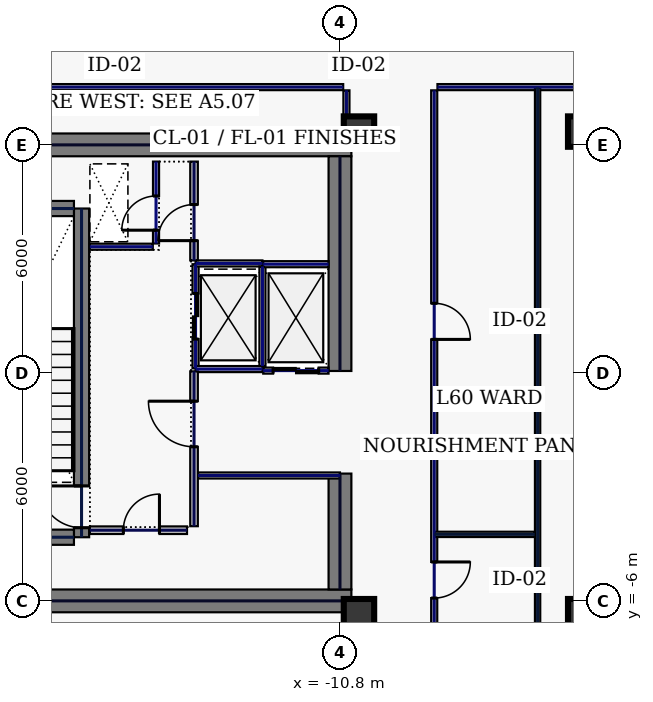
"""IFC4 building model, lengths in metres.
Left out: names, types, materials, properties, quantities, classifications, styles, units other than length and angle.
Written with IfcOpenShell. Run it as: python <this file> out.ifc"""

import sys

from ifc_helpers import new_model, si_unit, direction, frame, frame_2d, origin, origin_2d, place, context, subcontext, project, spatial, rectangle, hollow_rectangle, extrude, element, fill, save


model = new_model("IFC4")
c1 = context("Model", 3, precision=1e-05, world=origin(), true_north=direction((0.0, 1.0)))
c2 = subcontext(c1, "Body", "Model", "MODEL_VIEW")
j1 = project(units=[si_unit("LENGTHUNIT", "METRE"), si_unit("PLANEANGLEUNIT", "RADIAN")], contexts=[c1])
p1 = place(None, origin())
s1 = spatial("IfcSite", under=j1, at=p1, CompositionType="ELEMENT")
p2 = place(p1, origin())
s2 = spatial("IfcBuilding", under=s1, at=p2, CompositionType="ELEMENT")
p3 = place(p2, frame((0.0, 0.0, 259.0)))
s3 = spatial("IfcBuildingStorey", under=s2, at=p3, CompositionType="ELEMENT", Elevation=259.0)
for number, where, z_axis, x_axis in (
    (1, (-22.0, 6.0, 0.0), (0.0, 0.0, 1.0), (1.0, 0.0, 0.0)),
    (2, (-22.0, -6.0, 0.0), (0.0, 0.0, 1.0), (1.0, 0.0, 0.0)),
):
    element("IfcWall", number, at=place(p3, frame(where, z_axis=z_axis, x_axis=x_axis)), inside=s3, PredefinedType="SHEAR", context=c2, shape_type="SweptSolid", body=[
        extrude(rectangle(XDim=11.5, YDim=0.6, at=frame_2d((5.75, 0.0))), origin(), (0.0, 0.0, 1.0), 3.74),
    ])
p4 = place(p3, frame((-10.8, -5.7, 0.0), z_axis=(0.0, 0.0, 1.0), x_axis=(0.0, 1.0, 0.0)))
e3 = element("IfcWall", 3, at=p4, inside=s3, PredefinedType="SHEAR", context=c2, shape_type="SweptSolid", body=[
    extrude(rectangle(XDim=3.05, YDim=0.6, at=frame_2d((1.525, 0.0))), origin(), (0.0, 0.0, 1.0), 3.74),
])
p5 = place(p3, frame((-10.8, 0.05, 0.0), z_axis=(0.0, 0.0, 1.0), x_axis=(0.0, 1.0, 0.0)))
e4 = element("IfcWall", 4, at=p5, inside=s3, PredefinedType="SHEAR", context=c2, shape_type="SweptSolid", body=[
    extrude(rectangle(XDim=5.65, YDim=0.6, at=frame_2d((2.825, 0.0))), origin(), (0.0, 0.0, 1.0), 3.74),
])
p6 = place(p3, frame((-17.6, -4.325, 0.0), z_axis=(0.0, 0.0, 1.0), x_axis=(0.0, 1.0, 0.0)))
e5 = element("IfcWall", 5, at=p6, inside=s3, PredefinedType="SHEAR", context=c2, shape_type="SweptSolid", body=[
    extrude(rectangle(XDim=8.65, YDim=0.4, at=frame_2d((4.325, 0.0))), origin(), (0.0, 0.0, 1.0), 3.74),
])
p7 = place(p6, frame((0.25, 0.0, 0.0)))
e6 = element("IfcOpeningElement", 6, at=p7, cuts=e5, PredefinedType="OPENING", context=c2, shape_type="SweptSolid", body=[
    extrude(rectangle(XDim=1.1, YDim=2.2, at=frame_2d((0.55, 1.1))), frame((0.0, 0.21, 0.0), z_axis=(0.0, -1.0, 0.0), x_axis=(1.0, 0.0, 0.0)), (0.0, 0.0, 1.0), 0.42),
])
for number, where, z_axis, x_axis in (
    (7, (-21.2, -4.325, 0.0), (0.0, 0.0, 1.0), (1.0, 0.0, 0.0)),
    (8, (-21.2, 4.325, 0.0), (0.0, 0.0, 1.0), (1.0, 0.0, 0.0)),
):
    element("IfcWall", number, at=place(p3, frame(where, z_axis=z_axis, x_axis=x_axis)), inside=s3, PredefinedType="SHEAR", context=c2, shape_type="SweptSolid", body=[
        extrude(rectangle(XDim=3.4, YDim=0.4, at=frame_2d((1.7, 0.0))), origin(), (0.0, 0.0, 1.0), 3.74),
    ])
for number, where, z_axis, x_axis in (
    (9, (-10.3, -6.35, 0.0), (0.0, 0.0, 1.0), (1.0, 0.0, 0.0)),
    (10, (-10.3, 6.35, 0.0), (0.0, 0.0, 1.0), (1.0, 0.0, 0.0)),
    (11, (-4.4, -6.35, 0.0), (0.0, 0.0, 1.0), (1.0, 0.0, 0.0)),
    (12, (-4.4, 6.35, 0.0), (0.0, 0.0, 1.0), (1.0, 0.0, 0.0)),
):
    element("IfcColumn", number, at=place(p3, frame(where, z_axis=z_axis, x_axis=x_axis)), inside=s3, PredefinedType="COLUMN", context=c2, shape_type="SweptSolid", body=[
        extrude(hollow_rectangle(XDim=0.8, YDim=0.8, WallThickness=0.036, at=origin_2d()), origin(), (0.0, 0.0, 1.0), 3.74),
    ])
p8 = place(p3, frame((-14.6, 0.12, 0.0), z_axis=(0.0, 0.0, 1.0), x_axis=(0.0, 1.0, 0.0)))
e13 = element("IfcWall", 13, at=p8, inside=s3, PredefinedType="PARTITIONING", context=c2, shape_type="SweptSolid", body=[
    extrude(rectangle(XDim=2.74, YDim=0.16, at=frame_2d((1.37, 0.0))), origin(), (0.0, 0.0, 1.0), 3.74),
])
p9 = place(p8, frame((0.77, 0.0, 0.0)))
e14 = element("IfcOpeningElement", 14, at=p9, cuts=e13, PredefinedType="OPENING", context=c2, shape_type="SweptSolid", body=[
    extrude(rectangle(XDim=1.2, YDim=2.2, at=frame_2d((0.6, 1.1))), frame((0.0, 0.09, 0.0), z_axis=(0.0, -1.0, 0.0), x_axis=(1.0, 0.0, 0.0)), (0.0, 0.0, 1.0), 0.18),
])
for number, where, z_axis, x_axis in (
    (15, (-14.6, 0.1, 0.0), (0.0, 0.0, 1.0), (1.0, 0.0, 0.0)),
    (16, (-14.6, 2.88, 0.0), (0.0, 0.0, 1.0), (1.0, 0.0, 0.0)),
):
    element("IfcWall", number, at=place(p3, frame(where, z_axis=z_axis, x_axis=x_axis)), inside=s3, PredefinedType="PARTITIONING", context=c2, shape_type="SweptSolid", body=[
        extrude(rectangle(XDim=1.76, YDim=0.16, at=frame_2d((0.88, 0.0))), origin(), (0.0, 0.0, 1.0), 3.74),
    ])
p10 = place(p3, frame((-12.84, 0.18, 0.0), z_axis=(0.0, 0.0, 1.0), x_axis=(0.0, 1.0, 0.0)))
e17 = element("IfcWall", 17, at=p10, inside=s3, PredefinedType="PARTITIONING", context=c2, shape_type="SweptSolid", body=[
    extrude(rectangle(XDim=2.62, YDim=0.16, at=frame_2d((1.31, 0.0))), origin(), (0.0, 0.0, 1.0), 3.74),
])
p11 = place(p3, frame((-12.82, 0.06, 0.0), z_axis=(0.0, 0.0, 1.0), x_axis=(1.0, 0.0, 0.0)))
e18 = element("IfcWall", 18, at=p11, inside=s3, PredefinedType="PARTITIONING", context=c2, shape_type="SweptSolid", body=[
    extrude(rectangle(XDim=1.72, YDim=0.16, at=frame_2d((0.86, 0.0))), origin(), (0.0, 0.0, 1.0), 3.74),
])
p12 = place(p11, frame((0.26, 0.0, 0.0)))
e19 = element("IfcOpeningElement", 19, at=p12, cuts=e18, PredefinedType="OPENING", context=c2, shape_type="SweptSolid", body=[
    extrude(rectangle(XDim=1.2, YDim=2.2, at=frame_2d((0.6, 1.1))), frame((0.0, 0.09, 0.0), z_axis=(0.0, -1.0, 0.0), x_axis=(1.0, 0.0, 0.0)), (0.0, 0.0, 1.0), 0.18),
])
p13 = place(p3, frame((-12.82, 2.86, 0.0), z_axis=(0.0, 0.0, 1.0), x_axis=(1.0, 0.0, 0.0)))
e20 = element("IfcWall", 20, at=p13, inside=s3, PredefinedType="PARTITIONING", context=c2, shape_type="SweptSolid", body=[
    extrude(rectangle(XDim=1.72, YDim=0.16, at=frame_2d((0.86, 0.0))), origin(), (0.0, 0.0, 1.0), 3.74),
])
p14 = place(p3, frame((-15.64, 3.405, 0.0), z_axis=(0.0, 0.0, 1.0), x_axis=(0.0, 1.0, 0.0)))
e21 = element("IfcWall", 21, at=p14, inside=s3, PredefinedType="PARTITIONING", context=c2, shape_type="SweptSolid", body=[
    extrude(rectangle(XDim=2.155, YDim=0.16, at=frame_2d((1.078, 0.0))), origin(), (0.0, 0.0, 1.0), 3.74),
])
p15 = place(p14, frame((0.35, 0.0, 0.0)))
e22 = element("IfcOpeningElement", 22, at=p15, cuts=e21, PredefinedType="OPENING", context=c2, shape_type="SweptSolid", body=[
    extrude(rectangle(XDim=0.9, YDim=2.2, at=frame_2d((0.45, 1.1))), frame((0.0, 0.09, 0.0), z_axis=(0.0, -1.0, 0.0), x_axis=(1.0, 0.0, 0.0)), (0.0, 0.0, 1.0), 0.18),
])
p16 = place(p3, frame((-17.38, 3.32, 0.0), z_axis=(0.0, 0.0, 1.0), x_axis=(1.0, 0.0, 0.0)))
e23 = element("IfcWall", 23, at=p16, inside=s3, PredefinedType="PARTITIONING", context=c2, shape_type="SweptSolid", body=[
    extrude(rectangle(XDim=1.655, YDim=0.16, at=frame_2d((0.827, 0.0))), origin(), (0.0, 0.0, 1.0), 3.74),
])
p17 = place(p3, frame((-17.38, -4.14, 0.0), z_axis=(0.0, 0.0, 1.0), x_axis=(1.0, 0.0, 0.0)))
e24 = element("IfcWall", 24, at=p17, inside=s3, PredefinedType="SOLIDWALL", context=c2, shape_type="SweptSolid", body=[
    extrude(rectangle(XDim=2.555, YDim=0.2, at=frame_2d((1.277, 0.0))), origin(), (0.0, 0.0, 1.0), 3.74),
])
p18 = place(p17, frame((0.88, 0.0, 0.0)))
e25 = element("IfcOpeningElement", 25, at=p18, cuts=e24, PredefinedType="OPENING", context=c2, shape_type="SweptSolid", body=[
    extrude(rectangle(XDim=0.95, YDim=2.2, at=frame_2d((0.475, 1.1))), frame((0.0, 0.11, 0.0), z_axis=(0.0, -1.0, 0.0), x_axis=(1.0, 0.0, 0.0)), (0.0, 0.0, 1.0), 0.22),
])
p19 = place(p3, frame((-14.535, -2.7, 0.0), z_axis=(0.0, 0.0, 1.0), x_axis=(1.0, 0.0, 0.0)))
e26 = element("IfcWall", 26, at=p19, inside=s3, PredefinedType="PARTITIONING", context=c2, shape_type="SweptSolid", body=[
    extrude(rectangle(XDim=3.735, YDim=0.16, at=frame_2d((1.867, 0.0))), origin(), (0.0, 0.0, 1.0), 3.74),
])
p20 = place(p3, frame((-14.64, 2.96, 0.0), z_axis=(0.0, 0.0, 1.0), x_axis=(0.0, 1.0, 0.0)))
e27 = element("IfcWall", 27, at=p20, inside=s3, PredefinedType="SOLIDWALL", context=c2, shape_type="SweptSolid", body=[
    extrude(rectangle(XDim=2.6, YDim=0.2, at=frame_2d((1.3, 0.0))), origin(), (0.0, 0.0, 1.0), 3.74),
])
p21 = place(p20, frame((0.52, 0.0, 0.0)))
e28 = element("IfcOpeningElement", 28, at=p21, cuts=e27, PredefinedType="OPENING", context=c2, shape_type="SweptSolid", body=[
    extrude(rectangle(XDim=0.95, YDim=2.2, at=frame_2d((0.475, 1.1))), frame((0.0, 0.11, 0.0), z_axis=(0.0, -1.0, 0.0), x_axis=(1.0, 0.0, 0.0)), (0.0, 0.0, 1.0), 0.22),
])
p22 = place(p3, frame((-14.64, -4.035, 0.0), z_axis=(0.0, 0.0, 1.0), x_axis=(0.0, 1.0, 0.0)))
e29 = element("IfcWall", 29, at=p22, inside=s3, PredefinedType="SOLIDWALL", context=c2, shape_type="SweptSolid", body=[
    extrude(rectangle(XDim=4.075, YDim=0.2, at=frame_2d((2.038, 0.0))), origin(), (0.0, 0.0, 1.0), 3.74),
])
p23 = place(p22, frame((2.09, 0.0, 0.0)))
e30 = element("IfcOpeningElement", 30, at=p23, cuts=e29, PredefinedType="OPENING", context=c2, shape_type="SweptSolid", body=[
    extrude(rectangle(XDim=1.2, YDim=2.2, at=frame_2d((0.6, 1.1))), frame((0.0, 0.11, 0.0), z_axis=(0.0, -1.0, 0.0), x_axis=(1.0, 0.0, 0.0)), (0.0, 0.0, 1.0), 0.22),
])
p24 = place(p3, frame((-3.965, 7.52, 0.0), z_axis=(0.0, 0.0, 1.0), x_axis=(-1.0, 0.0, 0.0)))
e31 = element("IfcWall", 31, at=p24, inside=s3, PredefinedType="PARTITIONING", context=c2, shape_type="SweptSolid", body=[
    extrude(rectangle(XDim=4.27, YDim=0.16, at=frame_2d((2.135, 0.0))), origin(), (0.0, 0.0, 1.0), 3.74),
])
p25 = place(p3, frame((-8.32, 7.435, 0.0), z_axis=(0.0, 0.0, 1.0), x_axis=(0.0, -1.0, 0.0)))
e32 = element("IfcWall", 32, at=p25, inside=s3, PredefinedType="PARTITIONING", context=c2, shape_type="SweptSolid", body=[
    extrude(rectangle(XDim=14.82, YDim=0.16, at=frame_2d((7.41, 0.0))), origin(), (0.0, 0.0, 1.0), 3.74),
])
p26 = place(p25, frame((12.411, 0.0, 0.0)))
e33 = element("IfcOpeningElement", 33, at=p26, cuts=e32, PredefinedType="OPENING", context=c2, shape_type="SweptSolid", body=[
    extrude(rectangle(XDim=0.95, YDim=2.2, at=frame_2d((0.475, 1.1))), frame((0.0, 0.09, 0.0), z_axis=(0.0, -1.0, 0.0), x_axis=(1.0, 0.0, 0.0)), (0.0, 0.0, 1.0), 0.18),
])
p27 = place(p25, frame((5.604, 0.0, 0.0)))
e34 = element("IfcOpeningElement", 34, at=p27, cuts=e32, PredefinedType="OPENING", context=c2, shape_type="SweptSolid", body=[
    extrude(rectangle(XDim=0.95, YDim=2.2, at=frame_2d((0.475, 1.1))), frame((0.0, 0.09, 0.0), z_axis=(0.0, -1.0, 0.0), x_axis=(1.0, 0.0, 0.0)), (0.0, 0.0, 1.0), 0.18),
])
p28 = place(p3, frame((-10.63, -7.385, 0.0), z_axis=(0.0, 0.0, 1.0), x_axis=(0.0, 1.0, 0.0)))
e35 = element("IfcWall", 35, at=p28, inside=s3, PredefinedType="PARTITIONING", context=c2, shape_type="SweptSolid", body=[
    extrude(rectangle(XDim=0.965, YDim=0.16, at=frame_2d((0.482, 0.0))), origin(), (0.0, 0.0, 1.0), 3.74),
])
p29 = place(p3, frame((-10.63, 6.42, 0.0), z_axis=(0.0, 0.0, 1.0), x_axis=(0.0, 1.0, 0.0)))
e36 = element("IfcWall", 36, at=p29, inside=s3, PredefinedType="PARTITIONING", context=c2, shape_type="SweptSolid", body=[
    extrude(rectangle(XDim=1.015, YDim=0.16, at=frame_2d((0.508, 0.0))), origin(), (0.0, 0.0, 1.0), 3.74),
])
p30 = place(p3, frame((-10.715, 7.52, 0.0), z_axis=(0.0, 0.0, 1.0), x_axis=(-1.0, 0.0, 0.0)))
e37 = element("IfcWall", 37, at=p30, inside=s3, PredefinedType="PARTITIONING", context=c2, shape_type="SweptSolid", body=[
    extrude(rectangle(XDim=11.87, YDim=0.16, at=frame_2d((5.935, 0.0))), origin(), (0.0, 0.0, 1.0), 3.74),
])
p31 = place(p3, frame((-5.6, -7.465, 0.0), z_axis=(0.0, 0.0, 1.0), x_axis=(0.0, 1.0, 0.0)))
e38 = element("IfcWall", 38, at=p31, inside=s3, PredefinedType="PARTITIONING", context=c2, shape_type="SweptSolid", body=[
    extrude(rectangle(XDim=14.98, YDim=0.14, at=frame_2d((7.49, 0.0))), origin(), (0.0, 0.0, 1.0), 3.74),
])
p32 = place(p3, frame((-8.315, -4.25, 0.0), z_axis=(0.0, 0.0, 1.0), x_axis=(1.0, 0.0, 0.0)))
e39 = element("IfcWall", 39, at=p32, inside=s3, PredefinedType="PARTITIONING", context=c2, shape_type="SweptSolid", body=[
    extrude(rectangle(XDim=2.64, YDim=0.14, at=frame_2d((1.32, 0.0))), origin(), (0.0, 0.0, 1.0), 3.74),
])
p33 = place(p7, origin())
e40 = element("IfcDoor", 40, at=p33, inside=s3, OperationType="SINGLE_SWING_RIGHT", PredefinedType="DOOR", context=c2, shape_type="SweptSolid", body=[
    extrude(rectangle(XDim=1.1, YDim=2.2, at=frame_2d((0.55, 1.1))), frame((0.0, 0.025, 0.0), z_axis=(0.0, -1.0, 0.0), x_axis=(1.0, 0.0, 0.0)), (0.0, 0.0, 1.0), 0.05),
])
fill(e6, e40)
p34 = place(p9, origin())
e41 = element("IfcDoor", 41, at=p34, inside=s3, OperationType="SLIDING_TO_LEFT", PredefinedType="DOOR", context=c2, shape_type="SweptSolid", body=[
    extrude(rectangle(XDim=1.2, YDim=2.2, at=frame_2d((0.6, 1.1))), frame((0.0, 0.025, 0.0), z_axis=(0.0, -1.0, 0.0), x_axis=(1.0, 0.0, 0.0)), (0.0, 0.0, 1.0), 0.05),
])
fill(e14, e41)
p35 = place(p12, origin())
e42 = element("IfcDoor", 42, at=p35, inside=s3, OperationType="SLIDING_TO_LEFT", PredefinedType="DOOR", context=c2, shape_type="SweptSolid", body=[
    extrude(rectangle(XDim=1.2, YDim=2.2, at=frame_2d((0.6, 1.1))), frame((0.0, 0.025, 0.0), z_axis=(0.0, -1.0, 0.0), x_axis=(1.0, 0.0, 0.0)), (0.0, 0.0, 1.0), 0.05),
])
fill(e19, e42)
p36 = place(p15, origin())
e43 = element("IfcDoor", 43, at=p36, inside=s3, OperationType="SINGLE_SWING_LEFT", PredefinedType="DOOR", context=c2, shape_type="SweptSolid", body=[
    extrude(rectangle(XDim=0.9, YDim=2.2, at=frame_2d((0.45, 1.1))), frame((0.0, 0.025, 0.0), z_axis=(0.0, -1.0, 0.0), x_axis=(1.0, 0.0, 0.0)), (0.0, 0.0, 1.0), 0.05),
])
fill(e22, e43)
p37 = place(p18, origin())
e44 = element("IfcDoor", 44, at=p37, inside=s3, OperationType="SINGLE_SWING_RIGHT", PredefinedType="DOOR", context=c2, shape_type="SweptSolid", body=[
    extrude(rectangle(XDim=0.95, YDim=2.2, at=frame_2d((0.475, 1.1))), frame((0.0, 0.025, 0.0), z_axis=(0.0, -1.0, 0.0), x_axis=(1.0, 0.0, 0.0)), (0.0, 0.0, 1.0), 0.05),
])
fill(e25, e44)
p38 = place(p21, origin())
e45 = element("IfcDoor", 45, at=p38, inside=s3, OperationType="SINGLE_SWING_LEFT", PredefinedType="DOOR", context=c2, shape_type="SweptSolid", body=[
    extrude(rectangle(XDim=0.95, YDim=2.2, at=frame_2d((0.475, 1.1))), frame((0.0, 0.025, 0.0), z_axis=(0.0, -1.0, 0.0), x_axis=(1.0, 0.0, 0.0)), (0.0, 0.0, 1.0), 0.05),
])
fill(e28, e45)
p39 = place(p23, origin())
e46 = element("IfcDoor", 46, at=p39, inside=s3, OperationType="SINGLE_SWING_RIGHT", PredefinedType="DOOR", context=c2, shape_type="SweptSolid", body=[
    extrude(rectangle(XDim=1.2, YDim=2.2, at=frame_2d((0.6, 1.1))), frame((0.0, 0.025, 0.0), z_axis=(0.0, -1.0, 0.0), x_axis=(1.0, 0.0, 0.0)), (0.0, 0.0, 1.0), 0.05),
])
fill(e30, e46)
p40 = place(p26, origin())
e47 = element("IfcDoor", 47, at=p40, inside=s3, OperationType="SINGLE_SWING_LEFT", PredefinedType="DOOR", context=c2, shape_type="SweptSolid", body=[
    extrude(rectangle(XDim=0.95, YDim=2.2, at=frame_2d((0.475, 1.1))), frame((0.0, 0.025, 0.0), z_axis=(0.0, -1.0, 0.0), x_axis=(1.0, 0.0, 0.0)), (0.0, 0.0, 1.0), 0.05),
])
fill(e33, e47)
p41 = place(p27, origin())
e48 = element("IfcDoor", 48, at=p41, inside=s3, OperationType="SINGLE_SWING_RIGHT", PredefinedType="DOOR", context=c2, shape_type="SweptSolid", body=[
    extrude(rectangle(XDim=0.95, YDim=2.2, at=frame_2d((0.475, 1.1))), frame((0.0, 0.025, 0.0), z_axis=(0.0, -1.0, 0.0), x_axis=(1.0, 0.0, 0.0)), (0.0, 0.0, 1.0), 0.05),
])
fill(e34, e48)
save(model, sys.argv[1])
